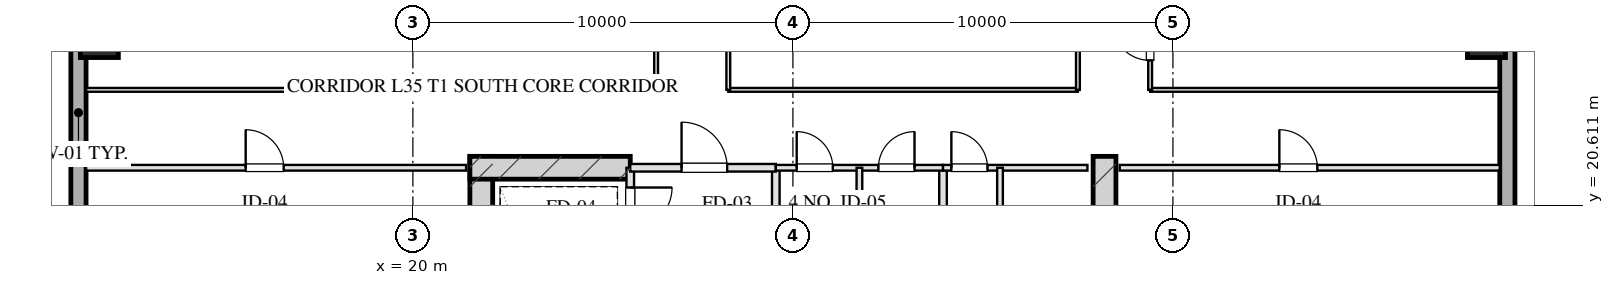
"""IFC4 building model, lengths in metres.
Left out: names, types, materials, properties, quantities, classifications, styles, units other than length and angle.
Written with IfcOpenShell. Run it as: python <this file> out.ifc"""

import sys

from ifc_helpers import new_model, si_unit, direction, frame, frame_2d, origin, origin_2d, place, context, subcontext, project, spatial, rectangle, hollow_rectangle, extrude, element, fill, save


model = new_model("IFC4")
c1 = context("Model", 3, precision=1e-05, world=origin(), true_north=direction((0.0, 1.0)))
c2 = subcontext(c1, "Body", "Model", "MODEL_VIEW")
j1 = project(units=[si_unit("LENGTHUNIT", "METRE"), si_unit("PLANEANGLEUNIT", "RADIAN")], contexts=[c1])
p1 = place(None, origin())
s1 = spatial("IfcSite", under=j1, at=p1, CompositionType="ELEMENT")
p2 = place(p1, origin())
s2 = spatial("IfcBuilding", under=s1, at=p2, CompositionType="ELEMENT")
p3 = place(p2, frame((0.0, 0.0, 134.55)))
s3 = spatial("IfcBuildingStorey", under=s2, at=p3, CompositionType="ELEMENT", Elevation=134.55)
for number, where, z_axis, x_axis in (
    (1, (21.8, 21.9, 0.0), (0.0, 0.0, 1.0), (0.0, -1.0, 0.0)),
    (2, (38.2, 21.9, 0.0), (0.0, 0.0, 1.0), (0.0, -1.0, 0.0)),
):
    element("IfcWall", number, at=place(p3, frame(where, z_axis=z_axis, x_axis=x_axis)), inside=s3, PredefinedType="SHEAR", context=c2, shape_type="SweptSolid", body=[
        extrude(rectangle(XDim=9.48, YDim=0.6, at=frame_2d((4.74, 0.0))), origin(), (0.0, 0.0, 1.0), 3.45),
    ])
p4 = place(p3, frame((21.5, 21.6, 0.0), z_axis=(0.0, 0.0, 1.0), x_axis=(1.0, 0.0, 0.0)))
e3 = element("IfcWall", 3, at=p4, inside=s3, PredefinedType="SHEAR", context=c2, shape_type="SweptSolid", body=[
    extrude(rectangle(XDim=4.22, YDim=0.6, at=frame_2d((2.11, 0.0))), origin(), (0.0, 0.0, 1.0), 3.45),
])
for number, where, z_axis, x_axis in (
    (4, (11.75, 25.0, 0.0), (0.0, 0.0, 1.0), (1.0, 0.0, 0.0)),
    (5, (48.25, 25.0, 0.0), (0.0, 0.0, 1.0), (1.0, 0.0, 0.0)),
):
    element("IfcColumn", number, at=place(p3, frame(where, z_axis=z_axis, x_axis=x_axis)), inside=s3, PredefinedType="COLUMN", context=c2, shape_type="SweptSolid", body=[
        extrude(hollow_rectangle(XDim=1.0, YDim=1.0, WallThickness=0.036, at=origin_2d()), origin(), (0.0, 0.0, 1.0), 3.451),
    ])
p5 = place(p3, frame((11.2, 9.0, 0.0), z_axis=(0.0, 0.0, 1.0), x_axis=(0.0, 1.0, 0.0)))
e6 = element("IfcWall", 6, at=p5, inside=s3, PredefinedType="SOLIDWALL", context=c2, shape_type="SweptSolid", body=[
    extrude(rectangle(XDim=50.0, YDim=0.4, at=frame_2d((25.0, 0.0))), origin(), (0.0, 0.0, 1.0), 2.55),
])
p6 = place(p5, frame((17.475, 0.0, 0.75)))
e7 = element("IfcOpeningElement", 7, at=p6, cuts=e6, PredefinedType="OPENING", context=c2, shape_type="SweptSolid", body=[
    extrude(rectangle(XDim=2.25, YDim=1.4, at=frame_2d((1.125, 0.7))), frame((0.0, 0.21, 0.0), z_axis=(0.0, -1.0, 0.0), x_axis=(1.0, 0.0, 0.0)), (0.0, 0.0, 1.0), 0.42),
])
p7 = place(p5, frame((21.275, 0.0, 0.75)))
e8 = element("IfcOpeningElement", 8, at=p7, cuts=e6, PredefinedType="OPENING", context=c2, shape_type="SweptSolid", body=[
    extrude(rectangle(XDim=2.25, YDim=1.4, at=frame_2d((1.125, 0.7))), frame((0.0, 0.21, 0.0), z_axis=(0.0, -1.0, 0.0), x_axis=(1.0, 0.0, 0.0)), (0.0, 0.0, 1.0), 0.42),
])
p8 = place(p5, frame((28.85, 0.0, 0.0)))
e9 = element("IfcOpeningElement", 9, at=p8, cuts=e6, PredefinedType="OPENING", context=c2, shape_type="SweptSolid", body=[
    extrude(rectangle(XDim=1.1, YDim=2.15, at=frame_2d((0.55, 1.075))), frame((0.0, 0.21, 0.0), z_axis=(0.0, -1.0, 0.0), x_axis=(1.0, 0.0, 0.0)), (0.0, 0.0, 1.0), 0.42),
])
p9 = place(p3, frame((48.8, 59.0, 0.0), z_axis=(0.0, 0.0, 1.0), x_axis=(0.0, -1.0, 0.0)))
e10 = element("IfcWall", 10, at=p9, inside=s3, PredefinedType="SOLIDWALL", context=c2, shape_type="SweptSolid", body=[
    extrude(rectangle(XDim=50.0, YDim=0.4, at=frame_2d((25.0, 0.0))), origin(), (0.0, 0.0, 1.0), 2.55),
])
p10 = place(p9, frame((21.436, 0.0, 0.0)))
e11 = element("IfcOpeningElement", 11, at=p10, cuts=e10, PredefinedType="OPENING", context=c2, shape_type="SweptSolid", body=[
    extrude(rectangle(XDim=1.1, YDim=2.15, at=frame_2d((0.55, 1.075))), frame((0.0, 0.21, 0.0), z_axis=(0.0, -1.0, 0.0), x_axis=(1.0, 0.0, 0.0)), (0.0, 0.0, 1.0), 0.42),
])
p11 = place(p3, frame((25.72, 21.6, 0.0), z_axis=(0.0, 0.0, 1.0), x_axis=(0.0, -1.0, 0.0)))
e12 = element("IfcWall", 12, at=p11, inside=s3, PredefinedType="PARTITIONING", context=c2, shape_type="SweptSolid", body=[
    extrude(rectangle(XDim=1.9, YDim=0.2, at=frame_2d((0.95, 0.0))), origin(), (0.0, 0.0, 1.0), 3.155),
])
p12 = place(p11, frame((0.52, 0.0, 0.0)))
e13 = element("IfcOpeningElement", 13, at=p12, cuts=e12, PredefinedType="OPENING", context=c2, shape_type="SweptSolid", body=[
    extrude(rectangle(XDim=1.1, YDim=2.05, at=frame_2d((0.55, 1.025))), frame((0.0, 0.11, 0.0), z_axis=(0.0, -1.0, 0.0), x_axis=(1.0, 0.0, 0.0)), (0.0, 0.0, 1.0), 0.22),
])
p13 = place(p3, frame((29.55, 21.6, 0.0), z_axis=(0.0, 0.0, 1.0), x_axis=(0.0, -1.0, 0.0)))
e14 = element("IfcWall", 14, at=p13, inside=s3, PredefinedType="PARTITIONING", context=c2, shape_type="SweptSolid", body=[
    extrude(rectangle(XDim=8.43, YDim=0.2, at=frame_2d((4.215, 0.0))), origin(), (0.0, 0.0, 1.0), 3.155),
])
p14 = place(p3, frame((25.72, 21.6, 0.0), z_axis=(0.0, 0.0, 1.0), x_axis=(1.0, 0.0, 0.0)))
e15 = element("IfcWall", 15, at=p14, inside=s3, PredefinedType="PARTITIONING", context=c2, shape_type="SweptSolid", body=[
    extrude(rectangle(XDim=3.83, YDim=0.2, at=frame_2d((1.915, 0.0))), origin(), (0.0, 0.0, 1.0), 3.155),
])
p15 = place(p14, frame((1.35, 0.0, 0.0)))
e16 = element("IfcOpeningElement", 16, at=p15, cuts=e15, PredefinedType="OPENING", context=c2, shape_type="SweptSolid", body=[
    extrude(rectangle(XDim=1.2, YDim=2.05, at=frame_2d((0.6, 1.025))), frame((0.0, 0.11, 0.0), z_axis=(0.0, -1.0, 0.0), x_axis=(1.0, 0.0, 0.0)), (0.0, 0.0, 1.0), 0.22),
])
p16 = place(p3, frame((33.95, 21.6, 0.0), z_axis=(0.0, 0.0, 1.0), x_axis=(0.0, -1.0, 0.0)))
e17 = element("IfcWall", 17, at=p16, inside=s3, PredefinedType="PARTITIONING", context=c2, shape_type="SweptSolid", body=[
    extrude(rectangle(XDim=8.43, YDim=0.2, at=frame_2d((4.215, 0.0))), origin(), (0.0, 0.0, 1.0), 3.155),
])
p17 = place(p3, frame((29.55, 21.6, 0.0), z_axis=(0.0, 0.0, 1.0), x_axis=(1.0, 0.0, 0.0)))
e18 = element("IfcWall", 18, at=p17, inside=s3, PredefinedType="PARTITIONING", context=c2, shape_type="SweptSolid", body=[
    extrude(rectangle(XDim=4.4, YDim=0.15, at=frame_2d((2.2, 0.0))), origin(), (0.0, 0.0, 1.0), 3.155),
])
p18 = place(p17, frame((0.55, 0.0, 0.0)))
e19 = element("IfcOpeningElement", 19, at=p18, cuts=e18, PredefinedType="OPENING", context=c2, shape_type="SweptSolid", body=[
    extrude(rectangle(XDim=0.95, YDim=2.05, at=frame_2d((0.475, 1.025))), frame((0.0, 0.085, 0.0), z_axis=(0.0, -1.0, 0.0), x_axis=(1.0, 0.0, 0.0)), (0.0, 0.0, 1.0), 0.17),
])
p19 = place(p17, frame((2.7, 0.0, 0.0)))
e20 = element("IfcOpeningElement", 20, at=p19, cuts=e18, PredefinedType="OPENING", context=c2, shape_type="SweptSolid", body=[
    extrude(rectangle(XDim=0.95, YDim=2.05, at=frame_2d((0.475, 1.025))), frame((0.0, 0.085, 0.0), z_axis=(0.0, -1.0, 0.0), x_axis=(1.0, 0.0, 0.0)), (0.0, 0.0, 1.0), 0.17),
])
p20 = place(p3, frame((31.75, 21.6, 0.0), z_axis=(0.0, 0.0, 1.0), x_axis=(0.0, -1.0, 0.0)))
e21 = element("IfcWall", 21, at=p20, inside=s3, PredefinedType="PARTITIONING", context=c2, shape_type="SweptSolid", body=[
    extrude(rectangle(XDim=8.43, YDim=0.15, at=frame_2d((4.215, 0.0))), origin(), (0.0, 0.0, 1.0), 3.155),
])
p21 = place(p3, frame((33.95, 21.6, 0.0), z_axis=(0.0, 0.0, 1.0), x_axis=(1.0, 0.0, 0.0)))
e22 = element("IfcWall", 22, at=p21, inside=s3, PredefinedType="PARTITIONING", context=c2, shape_type="SweptSolid", body=[
    extrude(rectangle(XDim=3.8, YDim=0.15, at=frame_2d((1.9, 0.0))), origin(), (0.0, 0.0, 1.0), 3.155),
])
p22 = place(p21, frame((0.22, 0.0, 0.0)))
e23 = element("IfcOpeningElement", 23, at=p22, cuts=e22, PredefinedType="OPENING", context=c2, shape_type="SweptSolid", body=[
    extrude(rectangle(XDim=0.95, YDim=2.05, at=frame_2d((0.475, 1.025))), frame((0.0, 0.085, 0.0), z_axis=(0.0, -1.0, 0.0), x_axis=(1.0, 0.0, 0.0)), (0.0, 0.0, 1.0), 0.17),
])
p23 = place(p3, frame((35.45, 21.6, 0.0), z_axis=(0.0, 0.0, 1.0), x_axis=(0.0, -1.0, 0.0)))
e24 = element("IfcWall", 24, at=p23, inside=s3, PredefinedType="PARTITIONING", context=c2, shape_type="SweptSolid", body=[
    extrude(rectangle(XDim=8.43, YDim=0.15, at=frame_2d((4.215, 0.0))), origin(), (0.0, 0.0, 1.0), 2.795),
])
p24 = place(p23, frame((2.55, 0.0, 0.0)))
e25 = element("IfcOpeningElement", 25, at=p24, cuts=e24, PredefinedType="OPENING", context=c2, shape_type="SweptSolid", body=[
    extrude(rectangle(XDim=0.95, YDim=2.05, at=frame_2d((0.475, 1.025))), frame((0.0, 0.085, 0.0), z_axis=(0.0, -1.0, 0.0), x_axis=(1.0, 0.0, 0.0)), (0.0, 0.0, 1.0), 0.17),
])
p25 = place(p23, frame((4.7, 0.0, 0.0)))
e26 = element("IfcOpeningElement", 26, at=p25, cuts=e24, PredefinedType="OPENING", context=c2, shape_type="SweptSolid", body=[
    extrude(rectangle(XDim=0.9, YDim=2.05, at=frame_2d((0.45, 1.025))), frame((0.0, 0.085, 0.0), z_axis=(0.0, -1.0, 0.0), x_axis=(1.0, 0.0, 0.0)), (0.0, 0.0, 1.0), 0.17),
])
p26 = place(p23, frame((6.8, 0.0, 0.0)))
e27 = element("IfcOpeningElement", 27, at=p26, cuts=e24, PredefinedType="OPENING", context=c2, shape_type="SweptSolid", body=[
    extrude(rectangle(XDim=0.9, YDim=2.05, at=frame_2d((0.45, 1.025))), frame((0.0, 0.085, 0.0), z_axis=(0.0, -1.0, 0.0), x_axis=(1.0, 0.0, 0.0)), (0.0, 0.0, 1.0), 0.17),
])
p27 = place(p3, frame((11.4, 21.6, 0.0), z_axis=(0.0, 0.0, 1.0), x_axis=(1.0, 0.0, 0.0)))
e28 = element("IfcWall", 28, at=p27, inside=s3, PredefinedType="PARTITIONING", context=c2, shape_type="SweptSolid", body=[
    extrude(rectangle(XDim=10.0, YDim=0.15, at=frame_2d((5.0, 0.0))), origin(), (0.0, 0.0, 1.0), 3.155),
])
p28 = place(p27, frame((4.2, 0.0, 0.0)))
e29 = element("IfcOpeningElement", 29, at=p28, cuts=e28, PredefinedType="OPENING", context=c2, shape_type="SweptSolid", body=[
    extrude(rectangle(XDim=1.0, YDim=2.05, at=frame_2d((0.5, 1.025))), frame((0.0, 0.085, 0.0), z_axis=(0.0, -1.0, 0.0), x_axis=(1.0, 0.0, 0.0)), (0.0, 0.0, 1.0), 0.17),
])
p29 = place(p3, frame((38.6, 21.6, 0.0), z_axis=(0.0, 0.0, 1.0), x_axis=(1.0, 0.0, 0.0)))
e30 = element("IfcWall", 30, at=p29, inside=s3, PredefinedType="PARTITIONING", context=c2, shape_type="SweptSolid", body=[
    extrude(rectangle(XDim=10.0, YDim=0.15, at=frame_2d((5.0, 0.0))), origin(), (0.0, 0.0, 1.0), 3.155),
])
p30 = place(p29, frame((4.2, 0.0, 0.0)))
e31 = element("IfcOpeningElement", 31, at=p30, cuts=e30, PredefinedType="OPENING", context=c2, shape_type="SweptSolid", body=[
    extrude(rectangle(XDim=1.0, YDim=2.05, at=frame_2d((0.5, 1.025))), frame((0.0, 0.085, 0.0), z_axis=(0.0, -1.0, 0.0), x_axis=(1.0, 0.0, 0.0)), (0.0, 0.0, 1.0), 0.17),
])
p31 = place(p3, frame((11.4, 23.65, 0.0), z_axis=(0.0, 0.0, 1.0), x_axis=(1.0, 0.0, 0.0)))
e32 = element("IfcWall", 32, at=p31, inside=s3, PredefinedType="MOVABLE", context=c2, shape_type="SweptSolid", body=[
    extrude(rectangle(XDim=15.0, YDim=0.1, at=frame_2d((7.5, 0.0))), origin(), (0.0, 0.0, 1.0), 3.155),
])
p32 = place(p3, frame((28.3, 23.65, 0.0), z_axis=(0.0, 0.0, 1.0), x_axis=(1.0, 0.0, 0.0)))
e33 = element("IfcWall", 33, at=p32, inside=s3, PredefinedType="MOVABLE", context=c2, shape_type="SweptSolid", body=[
    extrude(rectangle(XDim=9.2, YDim=0.1, at=frame_2d((4.6, 0.0))), origin(), (0.0, 0.0, 1.0), 3.155),
])
p33 = place(p3, frame((39.4, 23.65, 0.0), z_axis=(0.0, 0.0, 1.0), x_axis=(1.0, 0.0, 0.0)))
e34 = element("IfcWall", 34, at=p33, inside=s3, PredefinedType="MOVABLE", context=c2, shape_type="SweptSolid", body=[
    extrude(rectangle(XDim=9.2, YDim=0.1, at=frame_2d((4.6, 0.0))), origin(), (0.0, 0.0, 1.0), 3.155),
])
p34 = place(p3, frame((26.4, 23.65, 0.0), z_axis=(0.0, 0.0, 1.0), x_axis=(0.0, 1.0, 0.0)))
e35 = element("IfcWall", 35, at=p34, inside=s3, PredefinedType="MOVABLE", context=c2, shape_type="SweptSolid", body=[
    extrude(rectangle(XDim=20.7, YDim=0.1, at=frame_2d((10.35, 0.0))), origin(), (0.0, 0.0, 1.0), 3.155),
])
p35 = place(p34, frame((4.124, 0.0, 0.0)))
e36 = element("IfcOpeningElement", 36, at=p35, cuts=e35, PredefinedType="OPENING", context=c2, shape_type="SweptSolid", body=[
    extrude(rectangle(XDim=1.0, YDim=2.05, at=frame_2d((0.5, 1.025))), frame((0.0, 0.06, 0.0), z_axis=(0.0, -1.0, 0.0), x_axis=(1.0, 0.0, 0.0)), (0.0, 0.0, 1.0), 0.12),
])
p36 = place(p34, frame((14.473, 0.0, 0.0)))
e37 = element("IfcOpeningElement", 37, at=p36, cuts=e35, PredefinedType="OPENING", context=c2, shape_type="SweptSolid", body=[
    extrude(rectangle(XDim=1.0, YDim=2.05, at=frame_2d((0.5, 1.025))), frame((0.0, 0.06, 0.0), z_axis=(0.0, -1.0, 0.0), x_axis=(1.0, 0.0, 0.0)), (0.0, 0.0, 1.0), 0.12),
])
p37 = place(p3, frame((28.3, 23.65, 0.0), z_axis=(0.0, 0.0, 1.0), x_axis=(0.0, 1.0, 0.0)))
e38 = element("IfcWall", 38, at=p37, inside=s3, PredefinedType="MOVABLE", context=c2, shape_type="SweptSolid", body=[
    extrude(rectangle(XDim=20.7, YDim=0.1, at=frame_2d((10.35, 0.0))), origin(), (0.0, 0.0, 1.0), 3.155),
])
p38 = place(p37, frame((4.117, 0.0, 0.0)))
e39 = element("IfcOpeningElement", 39, at=p38, cuts=e38, PredefinedType="OPENING", context=c2, shape_type="SweptSolid", body=[
    extrude(rectangle(XDim=1.1, YDim=2.05, at=frame_2d((0.55, 1.025))), frame((0.0, 0.06, 0.0), z_axis=(0.0, -1.0, 0.0), x_axis=(1.0, 0.0, 0.0)), (0.0, 0.0, 1.0), 0.12),
])
p39 = place(p37, frame((14.347, 0.0, 0.0)))
e40 = element("IfcOpeningElement", 40, at=p39, cuts=e38, PredefinedType="OPENING", context=c2, shape_type="SweptSolid", body=[
    extrude(rectangle(XDim=1.1, YDim=2.05, at=frame_2d((0.55, 1.025))), frame((0.0, 0.06, 0.0), z_axis=(0.0, -1.0, 0.0), x_axis=(1.0, 0.0, 0.0)), (0.0, 0.0, 1.0), 0.12),
])
p40 = place(p3, frame((37.5, 23.65, 0.0), z_axis=(0.0, 0.0, 1.0), x_axis=(0.0, 1.0, 0.0)))
e41 = element("IfcWall", 41, at=p40, inside=s3, PredefinedType="MOVABLE", context=c2, shape_type="SweptSolid", body=[
    extrude(rectangle(XDim=20.7, YDim=0.1, at=frame_2d((10.35, 0.0))), origin(), (0.0, 0.0, 1.0), 3.155),
])
p41 = place(p3, frame((39.4, 23.65, 0.0), z_axis=(0.0, 0.0, 1.0), x_axis=(0.0, 1.0, 0.0)))
e42 = element("IfcWall", 42, at=p41, inside=s3, PredefinedType="MOVABLE", context=c2, shape_type="SweptSolid", body=[
    extrude(rectangle(XDim=20.7, YDim=0.1, at=frame_2d((10.35, 0.0))), origin(), (0.0, 0.0, 1.0), 3.155),
])
p42 = place(p41, frame((0.775, 0.0, 0.0)))
e43 = element("IfcOpeningElement", 43, at=p42, cuts=e42, PredefinedType="OPENING", context=c2, shape_type="SweptSolid", body=[
    extrude(rectangle(XDim=1.0, YDim=2.05, at=frame_2d((0.5, 1.025))), frame((0.0, 0.06, 0.0), z_axis=(0.0, -1.0, 0.0), x_axis=(1.0, 0.0, 0.0)), (0.0, 0.0, 1.0), 0.12),
])
p43 = place(p41, frame((3.95, 0.0, 0.0)))
e44 = element("IfcOpeningElement", 44, at=p43, cuts=e42, PredefinedType="OPENING", context=c2, shape_type="SweptSolid", body=[
    extrude(rectangle(XDim=1.0, YDim=2.05, at=frame_2d((0.5, 1.025))), frame((0.0, 0.06, 0.0), z_axis=(0.0, -1.0, 0.0), x_axis=(1.0, 0.0, 0.0)), (0.0, 0.0, 1.0), 0.12),
])
p44 = place(p41, frame((8.298, 0.0, 0.0)))
e45 = element("IfcOpeningElement", 45, at=p44, cuts=e42, PredefinedType="OPENING", context=c2, shape_type="SweptSolid", body=[
    extrude(rectangle(XDim=1.05, YDim=2.05, at=frame_2d((0.525, 1.025))), frame((0.0, 0.06, 0.0), z_axis=(0.0, -1.0, 0.0), x_axis=(1.0, 0.0, 0.0)), (0.0, 0.0, 1.0), 0.12),
])
p45 = place(p41, frame((12.712, 0.0, 0.0)))
e46 = element("IfcOpeningElement", 46, at=p45, cuts=e42, PredefinedType="OPENING", context=c2, shape_type="SweptSolid", body=[
    extrude(rectangle(XDim=1.0, YDim=2.05, at=frame_2d((0.5, 1.025))), frame((0.0, 0.06, 0.0), z_axis=(0.0, -1.0, 0.0), x_axis=(1.0, 0.0, 0.0)), (0.0, 0.0, 1.0), 0.12),
])
p46 = place(p41, frame((16.231, 0.0, 0.0)))
e47 = element("IfcOpeningElement", 47, at=p46, cuts=e42, PredefinedType="OPENING", context=c2, shape_type="SweptSolid", body=[
    extrude(rectangle(XDim=1.0, YDim=2.05, at=frame_2d((0.5, 1.025))), frame((0.0, 0.06, 0.0), z_axis=(0.0, -1.0, 0.0), x_axis=(1.0, 0.0, 0.0)), (0.0, 0.0, 1.0), 0.12),
])
p47 = place(p41, frame((18.992, 0.0, 0.0)))
e48 = element("IfcOpeningElement", 48, at=p47, cuts=e42, PredefinedType="OPENING", context=c2, shape_type="SweptSolid", body=[
    extrude(rectangle(XDim=1.0, YDim=2.05, at=frame_2d((0.5, 1.025))), frame((0.0, 0.06, 0.0), z_axis=(0.0, -1.0, 0.0), x_axis=(1.0, 0.0, 0.0)), (0.0, 0.0, 1.0), 0.12),
])
p48 = place(p12, origin())
e49 = element("IfcDoor", 49, at=p48, inside=s3, OperationType="SINGLE_SWING_LEFT", PredefinedType="DOOR", context=c2, shape_type="SweptSolid", body=[
    extrude(rectangle(XDim=1.1, YDim=2.05, at=frame_2d((0.55, 1.025))), frame((0.0, 0.025, 0.0), z_axis=(0.0, -1.0, 0.0), x_axis=(1.0, 0.0, 0.0)), (0.0, 0.0, 1.0), 0.05),
])
fill(e13, e49)
p49 = place(p15, origin())
e50 = element("IfcDoor", 50, at=p49, inside=s3, OperationType="SINGLE_SWING_LEFT", PredefinedType="DOOR", context=c2, shape_type="SweptSolid", body=[
    extrude(rectangle(XDim=1.2, YDim=2.05, at=frame_2d((0.6, 1.025))), frame((0.0, 0.025, 0.0), z_axis=(0.0, -1.0, 0.0), x_axis=(1.0, 0.0, 0.0)), (0.0, 0.0, 1.0), 0.05),
])
fill(e16, e50)
p50 = place(p18, origin())
e51 = element("IfcDoor", 51, at=p50, inside=s3, OperationType="SINGLE_SWING_LEFT", PredefinedType="DOOR", context=c2, shape_type="SweptSolid", body=[
    extrude(rectangle(XDim=0.95, YDim=2.05, at=frame_2d((0.475, 1.025))), frame((0.0, 0.025, 0.0), z_axis=(0.0, -1.0, 0.0), x_axis=(1.0, 0.0, 0.0)), (0.0, 0.0, 1.0), 0.05),
])
fill(e19, e51)
p51 = place(p19, origin())
e52 = element("IfcDoor", 52, at=p51, inside=s3, OperationType="SINGLE_SWING_RIGHT", PredefinedType="DOOR", context=c2, shape_type="SweptSolid", body=[
    extrude(rectangle(XDim=0.95, YDim=2.05, at=frame_2d((0.475, 1.025))), frame((0.0, 0.025, 0.0), z_axis=(0.0, -1.0, 0.0), x_axis=(1.0, 0.0, 0.0)), (0.0, 0.0, 1.0), 0.05),
])
fill(e20, e52)
p52 = place(p22, origin())
e53 = element("IfcDoor", 53, at=p52, inside=s3, OperationType="SINGLE_SWING_LEFT", PredefinedType="DOOR", context=c2, shape_type="SweptSolid", body=[
    extrude(rectangle(XDim=0.95, YDim=2.05, at=frame_2d((0.475, 1.025))), frame((0.0, 0.025, 0.0), z_axis=(0.0, -1.0, 0.0), x_axis=(1.0, 0.0, 0.0)), (0.0, 0.0, 1.0), 0.05),
])
fill(e23, e53)
p53 = place(p28, origin())
e54 = element("IfcDoor", 54, at=p53, inside=s3, OperationType="SINGLE_SWING_LEFT", PredefinedType="DOOR", context=c2, shape_type="SweptSolid", body=[
    extrude(rectangle(XDim=1.0, YDim=2.05, at=frame_2d((0.5, 1.025))), frame((0.0, 0.025, 0.0), z_axis=(0.0, -1.0, 0.0), x_axis=(1.0, 0.0, 0.0)), (0.0, 0.0, 1.0), 0.05),
])
fill(e29, e54)
p54 = place(p30, origin())
e55 = element("IfcDoor", 55, at=p54, inside=s3, OperationType="SINGLE_SWING_LEFT", PredefinedType="DOOR", context=c2, shape_type="SweptSolid", body=[
    extrude(rectangle(XDim=1.0, YDim=2.05, at=frame_2d((0.5, 1.025))), frame((0.0, 0.025, 0.0), z_axis=(0.0, -1.0, 0.0), x_axis=(1.0, 0.0, 0.0)), (0.0, 0.0, 1.0), 0.05),
])
fill(e31, e55)
p55 = place(p42, origin())
e56 = element("IfcDoor", 56, at=p55, inside=s3, OperationType="SINGLE_SWING_RIGHT", PredefinedType="DOOR", context=c2, shape_type="SweptSolid", body=[
    extrude(rectangle(XDim=1.0, YDim=2.05, at=frame_2d((0.5, 1.025))), frame((0.0, 0.025, 0.0), z_axis=(0.0, -1.0, 0.0), x_axis=(1.0, 0.0, 0.0)), (0.0, 0.0, 1.0), 0.05),
])
fill(e43, e56)
save(model, sys.argv[1])
